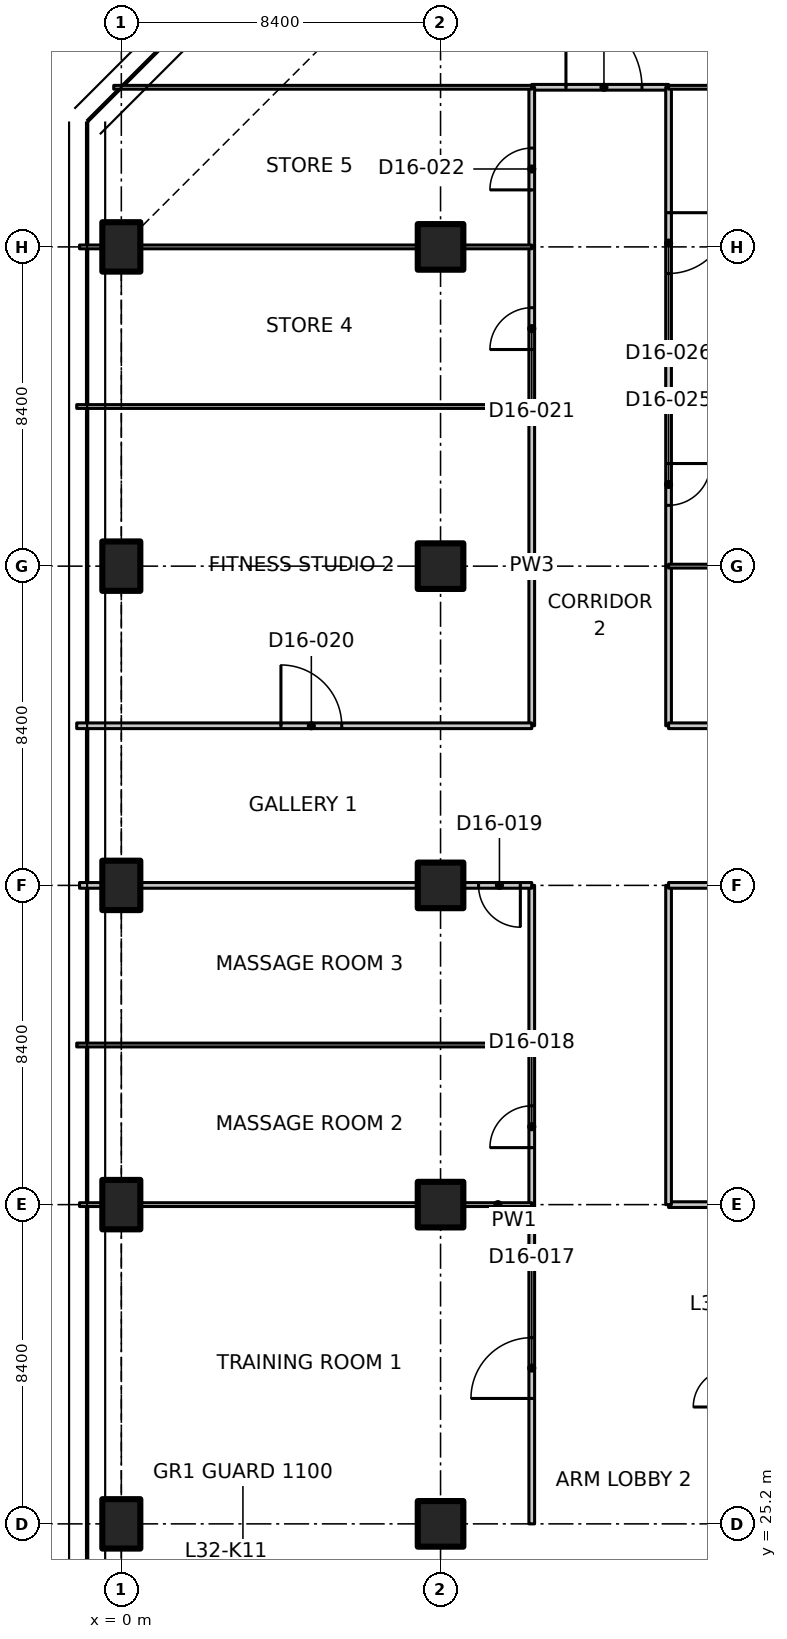
"""IFC4 building model, lengths in metres.
Left out: names, types, materials, properties, quantities, classifications, styles, units other than length and angle.
Written with IfcOpenShell. Run it as: python <this file> out.ifc"""

import sys

from ifc_helpers import new_model, si_unit, direction, frame, frame_2d, origin, origin_2d, place, context, subcontext, project, spatial, polyline, rectangle, outline, extrude, element, fill, save


model = new_model("IFC4")
c1 = context("Model", 3, precision=1e-05, world=origin(), true_north=direction((0.0, 1.0)))
c2 = subcontext(c1, "Body", "Model", "MODEL_VIEW")
j1 = project(units=[si_unit("LENGTHUNIT", "METRE"), si_unit("PLANEANGLEUNIT", "RADIAN")], contexts=[c1])
p1 = place(None, origin())
s1 = spatial("IfcSite", under=j1, at=p1, CompositionType="ELEMENT")
p2 = place(p1, origin())
s2 = spatial("IfcBuilding", under=s1, at=p2, CompositionType="ELEMENT")
p3 = place(p2, frame((0.0, 0.0, 131.3)))
s3 = spatial("IfcBuildingStorey", under=s2, at=p3, CompositionType="ELEMENT", Elevation=131.3)
for number, where, z_axis, x_axis in (
    (1, (0.0, 25.2, 0.0), (0.0, 0.0, 1.0), (1.0, 0.0, 0.0)),
    (2, (0.0, 33.6, 0.0), (0.0, 0.0, 1.0), (1.0, 0.0, 0.0)),
    (3, (0.0, 42.0, 0.0), (0.0, 0.0, 1.0), (1.0, 0.0, 0.0)),
    (4, (0.0, 50.4, 0.0), (0.0, 0.0, 1.0), (1.0, 0.0, 0.0)),
    (5, (0.0, 58.8, 0.0), (0.0, 0.0, 1.0), (1.0, 0.0, 0.0)),
):
    element("IfcColumn", number, at=place(p3, frame(where, z_axis=z_axis, x_axis=x_axis)), inside=s3, PredefinedType="COLUMN", context=c2, shape_type="SweptSolid", body=[
        extrude(rectangle(XDim=1.0, YDim=1.3, at=origin_2d()), origin(), (0.0, 0.0, 1.0), 3.35),
    ])
for number, where, z_axis, x_axis in (
    (6, (8.4, 25.2, 0.0), (0.0, 0.0, 1.0), (1.0, 0.0, 0.0)),
    (7, (8.4, 33.6, 0.0), (0.0, 0.0, 1.0), (1.0, 0.0, 0.0)),
    (8, (8.4, 42.0, 0.0), (0.0, 0.0, 1.0), (1.0, 0.0, 0.0)),
    (9, (8.4, 50.4, 0.0), (0.0, 0.0, 1.0), (1.0, 0.0, 0.0)),
    (10, (8.4, 58.8, 0.0), (0.0, 0.0, 1.0), (1.0, 0.0, 0.0)),
):
    element("IfcColumn", number, at=place(p3, frame(where, z_axis=z_axis, x_axis=x_axis)), inside=s3, PredefinedType="COLUMN", context=c2, shape_type="SweptSolid", body=[
        extrude(rectangle(XDim=1.2, YDim=1.2, at=origin_2d()), origin(), (0.0, 0.0, 1.0), 3.35),
    ])
p4 = place(p3, frame((10.8, 25.2, 0.0), z_axis=(0.0, 0.0, 1.0), x_axis=(0.0, 1.0, 0.0)))
e11 = element("IfcWall", 11, at=p4, inside=s3, PredefinedType="PARTITIONING", context=c2, shape_type="SweptSolid", body=[
    extrude(rectangle(XDim=8.4, YDim=0.15, at=frame_2d((4.2, 0.0))), origin(), (0.0, 0.0, 1.0), 3.33),
])
p5 = place(p4, frame((3.3, 0.0, 0.0)))
e12 = element("IfcOpeningElement", 12, at=p5, cuts=e11, PredefinedType="OPENING", context=c2, shape_type="SweptSolid", body=[
    extrude(rectangle(XDim=1.6, YDim=2.1, at=frame_2d((0.8, 1.05))), frame((0.0, 0.085, 0.0), z_axis=(0.0, -1.0, 0.0), x_axis=(1.0, 0.0, 0.0)), (0.0, 0.0, 1.0), 0.17),
])
p6 = place(p3, frame((14.4, 33.6, 0.0), z_axis=(0.0, 0.0, 1.0), x_axis=(1.0, 0.0, 0.0)))
e13 = element("IfcWall", 13, at=p6, inside=s3, PredefinedType="PARTITIONING", context=c2, shape_type="SweptSolid", body=[
    extrude(rectangle(XDim=1.5, YDim=0.15, at=frame_2d((0.75, 0.0))), origin(), (0.0, 0.0, 1.0), 3.33),
])
p7 = place(p3, frame((10.8, 63.0, 0.0), z_axis=(0.0, 0.0, 1.0), x_axis=(1.0, 0.0, 0.0)))
e14 = element("IfcWall", 14, at=p7, inside=s3, PredefinedType="PARTITIONING", context=c2, shape_type="SweptSolid", body=[
    extrude(rectangle(XDim=3.6, YDim=0.15, at=frame_2d((1.8, 0.0))), origin(), (0.0, 0.0, 1.0), 3.33),
])
p8 = place(p7, frame((0.9, 0.0, 0.0)))
e15 = element("IfcOpeningElement", 15, at=p8, cuts=e14, PredefinedType="OPENING", context=c2, shape_type="SweptSolid", body=[
    extrude(rectangle(XDim=2.0, YDim=2.4, at=frame_2d((1.0, 1.2))), frame((0.0, 0.085, 0.0), z_axis=(0.0, -1.0, 0.0), x_axis=(1.0, 0.0, 0.0)), (0.0, 0.0, 1.0), 0.17),
])
p9 = place(p3, frame((10.8, 33.6, 0.0), z_axis=(0.0, 0.0, 1.0), x_axis=(0.0, 1.0, 0.0)))
e16 = element("IfcWall", 16, at=p9, inside=s3, PredefinedType="PARTITIONING", context=c2, shape_type="SweptSolid", body=[
    extrude(rectangle(XDim=4.2, YDim=0.15, at=frame_2d((2.1, 0.0))), origin(), (0.0, 0.0, 1.0), 3.33),
])
p10 = place(p9, frame((1.5, 0.0, 0.0)))
e17 = element("IfcOpeningElement", 17, at=p10, cuts=e16, PredefinedType="OPENING", context=c2, shape_type="SweptSolid", body=[
    extrude(rectangle(XDim=1.1, YDim=2.1, at=frame_2d((0.55, 1.05))), frame((0.0, 0.085, 0.0), z_axis=(0.0, -1.0, 0.0), x_axis=(1.0, 0.0, 0.0)), (0.0, 0.0, 1.0), 0.17),
])
p11 = place(p3, frame((10.8, 37.8, 0.0), z_axis=(0.0, 0.0, 1.0), x_axis=(0.0, 1.0, 0.0)))
e18 = element("IfcWall", 18, at=p11, inside=s3, PredefinedType="PARTITIONING", context=c2, shape_type="SweptSolid", body=[
    extrude(rectangle(XDim=4.2, YDim=0.15, at=frame_2d((2.1, 0.0))), origin(), (0.0, 0.0, 1.0), 3.33),
])
p12 = place(p3, frame((10.8, 46.2, 0.0), z_axis=(0.0, 0.0, 1.0), x_axis=(0.0, 1.0, 0.0)))
e19 = element("IfcWall", 19, at=p12, inside=s3, PredefinedType="PARTITIONING", context=c2, shape_type="SweptSolid", body=[
    extrude(rectangle(XDim=8.4, YDim=0.15, at=frame_2d((4.2, 0.0))), origin(), (0.0, 0.0, 1.0), 3.33),
])
p13 = place(p3, frame((10.8, 54.6, 0.0), z_axis=(0.0, 0.0, 1.0), x_axis=(0.0, 1.0, 0.0)))
e20 = element("IfcWall", 20, at=p13, inside=s3, PredefinedType="PARTITIONING", context=c2, shape_type="SweptSolid", body=[
    extrude(rectangle(XDim=4.2, YDim=0.15, at=frame_2d((2.1, 0.0))), origin(), (0.0, 0.0, 1.0), 3.33),
])
p14 = place(p13, frame((1.5, 0.0, 0.0)))
e21 = element("IfcOpeningElement", 21, at=p14, cuts=e20, PredefinedType="OPENING", context=c2, shape_type="SweptSolid", body=[
    extrude(rectangle(XDim=1.1, YDim=2.1, at=frame_2d((0.55, 1.05))), frame((0.0, 0.085, 0.0), z_axis=(0.0, -1.0, 0.0), x_axis=(1.0, 0.0, 0.0)), (0.0, 0.0, 1.0), 0.17),
])
p15 = place(p3, frame((10.8, 58.8, 0.0), z_axis=(0.0, 0.0, 1.0), x_axis=(0.0, 1.0, 0.0)))
e22 = element("IfcWall", 22, at=p15, inside=s3, PredefinedType="PARTITIONING", context=c2, shape_type="SweptSolid", body=[
    extrude(rectangle(XDim=4.2, YDim=0.15, at=frame_2d((2.1, 0.0))), origin(), (0.0, 0.0, 1.0), 3.33),
])
p16 = place(p15, frame((1.5, 0.0, 0.0)))
e23 = element("IfcOpeningElement", 23, at=p16, cuts=e22, PredefinedType="OPENING", context=c2, shape_type="SweptSolid", body=[
    extrude(rectangle(XDim=1.1, YDim=2.1, at=frame_2d((0.55, 1.05))), frame((0.0, 0.085, 0.0), z_axis=(0.0, -1.0, 0.0), x_axis=(1.0, 0.0, 0.0)), (0.0, 0.0, 1.0), 0.17),
])
p17 = place(p3, frame((14.4, 42.0, 0.0), z_axis=(0.0, 0.0, 1.0), x_axis=(0.0, -1.0, 0.0)))
e24 = element("IfcWall", 24, at=p17, inside=s3, PredefinedType="PARTITIONING", context=c2, shape_type="SweptSolid", body=[
    extrude(rectangle(XDim=8.4, YDim=0.15, at=frame_2d((4.2, 0.0))), origin(), (0.0, 0.0, 1.0), 3.33),
])
p18 = place(p3, frame((14.4, 50.4, 0.0), z_axis=(0.0, 0.0, 1.0), x_axis=(0.0, -1.0, 0.0)))
e25 = element("IfcWall", 25, at=p18, inside=s3, PredefinedType="PARTITIONING", context=c2, shape_type="SweptSolid", body=[
    extrude(rectangle(XDim=4.2, YDim=0.15, at=frame_2d((2.1, 0.0))), origin(), (0.0, 0.0, 1.0), 3.33),
])
p19 = place(p3, frame((14.4, 54.6, 0.0), z_axis=(0.0, 0.0, 1.0), x_axis=(0.0, -1.0, 0.0)))
e26 = element("IfcWall", 26, at=p19, inside=s3, PredefinedType="PARTITIONING", context=c2, shape_type="SweptSolid", body=[
    extrude(rectangle(XDim=4.2, YDim=0.15, at=frame_2d((2.1, 0.0))), origin(), (0.0, 0.0, 1.0), 3.33),
])
p20 = place(p19, frame((1.5, 0.0, 0.0)))
e27 = element("IfcOpeningElement", 27, at=p20, cuts=e26, PredefinedType="OPENING", context=c2, shape_type="SweptSolid", body=[
    extrude(rectangle(XDim=1.1, YDim=2.1, at=frame_2d((0.55, 1.05))), frame((0.0, 0.085, 0.0), z_axis=(0.0, -1.0, 0.0), x_axis=(1.0, 0.0, 0.0)), (0.0, 0.0, 1.0), 0.17),
])
p21 = place(p3, frame((14.4, 63.0, 0.0), z_axis=(0.0, 0.0, 1.0), x_axis=(0.0, -1.0, 0.0)))
e28 = element("IfcWall", 28, at=p21, inside=s3, PredefinedType="PARTITIONING", context=c2, shape_type="SweptSolid", body=[
    extrude(rectangle(XDim=8.4, YDim=0.15, at=frame_2d((4.2, 0.0))), origin(), (0.0, 0.0, 1.0), 3.33),
])
p22 = place(p21, frame((3.3, 0.0, 0.0)))
e29 = element("IfcOpeningElement", 29, at=p22, cuts=e28, PredefinedType="OPENING", context=c2, shape_type="SweptSolid", body=[
    extrude(rectangle(XDim=1.6, YDim=2.1, at=frame_2d((0.8, 1.05))), frame((0.0, 0.085, 0.0), z_axis=(0.0, -1.0, 0.0), x_axis=(1.0, 0.0, 0.0)), (0.0, 0.0, 1.0), 0.17),
])
p23 = place(p3, frame((10.8, 63.0, 0.0), z_axis=(0.0, 0.0, 1.0), x_axis=(-1.0, 0.0, 0.0)))
e30 = element("IfcWall", 30, at=p23, inside=s3, PredefinedType="PARTITIONING", context=c2, shape_type="SweptSolid", body=[
    extrude(outline(polyline([(0.0, 0.0), (11.0, 0.0), (11.0, 3.33), (7.266, 3.33), (7.264, 2.98), (5.936, 2.98), (5.934, 3.33), (0.0, 3.33), (0.0, 0.0)])), frame((0.0, 0.05, 0.0), z_axis=(0.0, -1.0, 0.0), x_axis=(1.0, 0.0, 0.0)), (0.0, 0.0, 1.0), 0.1),
])
p24 = place(p3, frame((25.4, 63.0, 0.0), z_axis=(0.0, 0.0, 1.0), x_axis=(-1.0, 0.0, 0.0)))
e31 = element("IfcWall", 31, at=p24, inside=s3, PredefinedType="PARTITIONING", context=c2, shape_type="SweptSolid", body=[
    extrude(outline(polyline([(0.0, 0.0), (11.0, 0.0), (11.0, 3.33), (5.066, 3.33), (5.064, 2.98), (3.736, 2.98), (3.734, 3.33), (0.0, 3.33), (0.0, 0.0)])), frame((0.0, 0.05, 0.0), z_axis=(0.0, -1.0, 0.0), x_axis=(1.0, 0.0, 0.0)), (0.0, 0.0, 1.0), 0.1),
])
p25 = place(p3, frame((10.8, 42.0, 0.0), z_axis=(0.0, 0.0, 1.0), x_axis=(-1.0, 0.0, 0.0)))
e32 = element("IfcWall", 32, at=p25, inside=s3, PredefinedType="PARTITIONING", context=c2, shape_type="SweptSolid", body=[
    extrude(rectangle(XDim=1.78, YDim=0.15, at=frame_2d((0.89, 0.0))), origin(), (0.0, 0.0, 1.0), 3.33),
])
p26 = place(p25, frame((0.3, 0.0, 0.0)))
e33 = element("IfcOpeningElement", 33, at=p26, cuts=e32, PredefinedType="OPENING", context=c2, shape_type="SweptSolid", body=[
    extrude(rectangle(XDim=1.1, YDim=2.1, at=frame_2d((0.55, 1.05))), frame((0.0, 0.085, 0.0), z_axis=(0.0, -1.0, 0.0), x_axis=(1.0, 0.0, 0.0)), (0.0, 0.0, 1.0), 0.17),
])
p27 = place(p3, frame((7.78, 42.0, 0.0), z_axis=(0.0, 0.0, 1.0), x_axis=(-1.0, 0.0, 0.0)))
e34 = element("IfcWall", 34, at=p27, inside=s3, PredefinedType="PARTITIONING", context=c2, shape_type="SweptSolid", body=[
    extrude(rectangle(XDim=7.26, YDim=0.15, at=frame_2d((3.63, 0.0))), origin(), (0.0, 0.0, 1.0), 3.33),
])
p28 = place(p3, frame((-0.52, 42.0, 0.0), z_axis=(0.0, 0.0, 1.0), x_axis=(-1.0, 0.0, 0.0)))
e35 = element("IfcWall", 35, at=p28, inside=s3, PredefinedType="PARTITIONING", context=c2, shape_type="SweptSolid", body=[
    extrude(rectangle(XDim=0.58, YDim=0.15, at=frame_2d((0.29, 0.0))), origin(), (0.0, 0.0, 1.0), 3.33),
])
p29 = place(p3, frame((-1.174, 46.2, 0.0), z_axis=(0.0, 0.0, 1.0), x_axis=(1.0, 0.0, 0.0)))
e36 = element("IfcWall", 36, at=p29, inside=s3, PredefinedType="PARTITIONING", context=c2, shape_type="SweptSolid", body=[
    extrude(outline(polyline([(0.0, 0.0), (11.974, 0.0), (11.974, 3.33), (1.624, 3.33), (1.622, 2.98), (0.726, 2.98), (0.724, 3.33), (0.074, 3.33), (0.0, 3.33), (0.0, 0.0)])), frame((0.0, 0.075, 0.0), z_axis=(0.0, -1.0, 0.0), x_axis=(1.0, 0.0, 0.0)), (0.0, 0.0, 1.0), 0.15),
])
p30 = place(p29, frame((5.374, 0.0, 0.0)))
e37 = element("IfcOpeningElement", 37, at=p30, cuts=e36, PredefinedType="OPENING", context=c2, shape_type="SweptSolid", body=[
    extrude(rectangle(XDim=1.6, YDim=2.1, at=frame_2d((0.8, 1.05))), frame((0.0, 0.085, 0.0), z_axis=(0.0, -1.0, 0.0), x_axis=(1.0, 0.0, 0.0)), (0.0, 0.0, 1.0), 0.17),
])
p31 = place(p3, frame((-1.1, 33.6, 0.0), z_axis=(0.0, 0.0, 1.0), x_axis=(1.0, 0.0, 0.0)))
e38 = element("IfcWall", 38, at=p31, inside=s3, PredefinedType="PARTITIONING", context=c2, shape_type="SweptSolid", body=[
    extrude(rectangle(XDim=0.58, YDim=0.1, at=frame_2d((0.29, 0.0))), origin(), (0.0, 0.0, 1.0), 3.33),
])
p32 = place(p3, frame((0.52, 33.6, 0.0), z_axis=(0.0, 0.0, 1.0), x_axis=(1.0, 0.0, 0.0)))
e39 = element("IfcWall", 39, at=p32, inside=s3, PredefinedType="PARTITIONING", context=c2, shape_type="SweptSolid", body=[
    extrude(rectangle(XDim=7.26, YDim=0.1, at=frame_2d((3.63, 0.0))), origin(), (0.0, 0.0, 1.0), 3.33),
])
p33 = place(p3, frame((9.02, 33.6, 0.0), z_axis=(0.0, 0.0, 1.0), x_axis=(1.0, 0.0, 0.0)))
e40 = element("IfcWall", 40, at=p33, inside=s3, PredefinedType="PARTITIONING", context=c2, shape_type="SweptSolid", body=[
    extrude(rectangle(XDim=1.78, YDim=0.1, at=frame_2d((0.89, 0.0))), origin(), (0.0, 0.0, 1.0), 3.33),
])
for number, where, z_axis, x_axis in (
    (41, (-1.174, 37.8, 0.0), (0.0, 0.0, 1.0), (1.0, 0.0, 0.0)),
    (42, (-1.174, 54.6, 0.0), (0.0, 0.0, 1.0), (1.0, 0.0, 0.0)),
):
    element("IfcWall", number, at=place(p3, frame(where, z_axis=z_axis, x_axis=x_axis)), inside=s3, PredefinedType="PARTITIONING", context=c2, shape_type="SweptSolid", body=[
        extrude(outline(polyline([(0.0, 0.0), (11.974, 0.0), (11.974, 3.33), (1.624, 3.33), (1.622, 2.98), (0.726, 2.98), (0.724, 3.33), (0.074, 3.33), (0.0, 3.33), (0.0, 0.0)])), frame((0.0, 0.05, 0.0), z_axis=(0.0, -1.0, 0.0), x_axis=(1.0, 0.0, 0.0)), (0.0, 0.0, 1.0), 0.1),
    ])
p34 = place(p3, frame((-1.1, 58.8, 0.0), z_axis=(0.0, 0.0, 1.0), x_axis=(1.0, 0.0, 0.0)))
e43 = element("IfcWall", 43, at=p34, inside=s3, PredefinedType="PARTITIONING", context=c2, shape_type="SweptSolid", body=[
    extrude(rectangle(XDim=0.58, YDim=0.1, at=frame_2d((0.29, 0.0))), origin(), (0.0, 0.0, 1.0), 3.33),
])
p35 = place(p3, frame((0.52, 58.8, 0.0), z_axis=(0.0, 0.0, 1.0), x_axis=(1.0, 0.0, 0.0)))
e44 = element("IfcWall", 44, at=p35, inside=s3, PredefinedType="PARTITIONING", context=c2, shape_type="SweptSolid", body=[
    extrude(outline(polyline([(0.0, 0.0), (7.26, 0.0), (7.26, 3.33), (0.146, 3.33), (0.144, 2.98), (0.0, 2.98), (0.0, 0.0)])), frame((0.0, 0.05, 0.0), z_axis=(0.0, -1.0, 0.0), x_axis=(1.0, 0.0, 0.0)), (0.0, 0.0, 1.0), 0.1),
])
p36 = place(p3, frame((9.02, 58.8, 0.0), z_axis=(0.0, 0.0, 1.0), x_axis=(1.0, 0.0, 0.0)))
e45 = element("IfcWall", 45, at=p36, inside=s3, PredefinedType="PARTITIONING", context=c2, shape_type="SweptSolid", body=[
    extrude(rectangle(XDim=1.78, YDim=0.1, at=frame_2d((0.89, 0.0))), origin(), (0.0, 0.0, 1.0), 3.33),
])
p37 = place(p3, frame((16.18, 42.0, 0.0), z_axis=(0.0, 0.0, 1.0), x_axis=(-1.0, 0.0, 0.0)))
e46 = element("IfcWall", 46, at=p37, inside=s3, PredefinedType="PARTITIONING", context=c2, shape_type="SweptSolid", body=[
    extrude(rectangle(XDim=1.78, YDim=0.15, at=frame_2d((0.89, 0.0))), origin(), (0.0, 0.0, 1.0), 3.33),
])
p38 = place(p3, frame((14.4, 46.2, 0.0), z_axis=(0.0, 0.0, 1.0), x_axis=(1.0, 0.0, 0.0)))
e47 = element("IfcWall", 47, at=p38, inside=s3, PredefinedType="PARTITIONING", context=c2, shape_type="SweptSolid", body=[
    extrude(outline(polyline([(0.0, 0.0), (11.974, 0.0), (11.974, 3.33), (11.9, 3.33), (11.25, 3.33), (11.248, 2.98), (10.352, 2.98), (10.35, 3.33), (0.0, 3.33), (0.0, 0.0)])), frame((0.0, 0.075, 0.0), z_axis=(0.0, -1.0, 0.0), x_axis=(1.0, 0.0, 0.0)), (0.0, 0.0, 1.0), 0.15),
])
p39 = place(p38, frame((5.4, 0.0, 0.0)))
e48 = element("IfcOpeningElement", 48, at=p39, cuts=e47, PredefinedType="OPENING", context=c2, shape_type="SweptSolid", body=[
    extrude(rectangle(XDim=1.1, YDim=2.1, at=frame_2d((0.55, 1.05))), frame((0.0, 0.085, 0.0), z_axis=(0.0, -1.0, 0.0), x_axis=(1.0, 0.0, 0.0)), (0.0, 0.0, 1.0), 0.17),
])
p40 = place(p3, frame((14.4, 50.4, 0.0), z_axis=(0.0, 0.0, 1.0), x_axis=(1.0, 0.0, 0.0)))
e49 = element("IfcWall", 49, at=p40, inside=s3, PredefinedType="PARTITIONING", context=c2, shape_type="SweptSolid", body=[
    extrude(rectangle(XDim=1.78, YDim=0.1, at=frame_2d((0.89, 0.0))), origin(), (0.0, 0.0, 1.0), 3.33),
])
p41 = place(p3, frame((14.4, 54.6, 0.0), z_axis=(0.0, 0.0, 1.0), x_axis=(1.0, 0.0, 0.0)))
e50 = element("IfcWall", 50, at=p41, inside=s3, PredefinedType="PARTITIONING", context=c2, shape_type="SweptSolid", body=[
    extrude(outline(polyline([(0.0, 0.0), (11.974, 0.0), (11.974, 3.33), (11.9, 3.33), (11.25, 3.33), (11.248, 2.98), (10.352, 2.98), (10.35, 3.33), (0.0, 3.33), (0.0, 0.0)])), frame((0.0, 0.05, 0.0), z_axis=(0.0, -1.0, 0.0), x_axis=(1.0, 0.0, 0.0)), (0.0, 0.0, 1.0), 0.1),
])
p42 = place(p8, origin())
e51 = element("IfcDoor", 51, at=p42, inside=s3, OperationType="DOUBLE_DOOR_SINGLE_SWING", PredefinedType="DOOR", context=c2, shape_type="SweptSolid", body=[
    extrude(rectangle(XDim=2.0, YDim=2.4, at=frame_2d((1.0, 1.2))), frame((0.0, 0.025, 0.0), z_axis=(0.0, -1.0, 0.0), x_axis=(1.0, 0.0, 0.0)), (0.0, 0.0, 1.0), 0.05),
])
fill(e15, e51)
p43 = place(p5, origin())
e52 = element("IfcDoor", 52, at=p43, inside=s3, OperationType="DOUBLE_DOOR_SINGLE_SWING", PredefinedType="DOOR", context=c2, shape_type="SweptSolid", body=[
    extrude(rectangle(XDim=1.6, YDim=2.1, at=frame_2d((0.8, 1.05))), frame((0.0, 0.025, 0.0), z_axis=(0.0, -1.0, 0.0), x_axis=(1.0, 0.0, 0.0)), (0.0, 0.0, 1.0), 0.05),
])
fill(e12, e52)
p44 = place(p10, origin())
e53 = element("IfcDoor", 53, at=p44, inside=s3, OperationType="SINGLE_SWING_LEFT", PredefinedType="DOOR", context=c2, shape_type="SweptSolid", body=[
    extrude(rectangle(XDim=1.1, YDim=2.1, at=frame_2d((0.55, 1.05))), frame((0.0, 0.025, 0.0), z_axis=(0.0, -1.0, 0.0), x_axis=(1.0, 0.0, 0.0)), (0.0, 0.0, 1.0), 0.05),
])
fill(e17, e53)
p45 = place(p26, origin())
e54 = element("IfcDoor", 54, at=p45, inside=s3, OperationType="SINGLE_SWING_LEFT", PredefinedType="DOOR", context=c2, shape_type="SweptSolid", body=[
    extrude(rectangle(XDim=1.1, YDim=2.1, at=frame_2d((0.55, 1.05))), frame((0.0, 0.025, 0.0), z_axis=(0.0, -1.0, 0.0), x_axis=(1.0, 0.0, 0.0)), (0.0, 0.0, 1.0), 0.05),
])
fill(e33, e54)
p46 = place(p30, origin())
e55 = element("IfcDoor", 55, at=p46, inside=s3, OperationType="DOUBLE_DOOR_SINGLE_SWING", PredefinedType="DOOR", context=c2, shape_type="SweptSolid", body=[
    extrude(rectangle(XDim=1.6, YDim=2.1, at=frame_2d((0.8, 1.05))), frame((0.0, 0.025, 0.0), z_axis=(0.0, -1.0, 0.0), x_axis=(1.0, 0.0, 0.0)), (0.0, 0.0, 1.0), 0.05),
])
fill(e37, e55)
p47 = place(p14, origin())
e56 = element("IfcDoor", 56, at=p47, inside=s3, OperationType="SINGLE_SWING_LEFT", PredefinedType="DOOR", context=c2, shape_type="SweptSolid", body=[
    extrude(rectangle(XDim=1.1, YDim=2.1, at=frame_2d((0.55, 1.05))), frame((0.0, 0.025, 0.0), z_axis=(0.0, -1.0, 0.0), x_axis=(1.0, 0.0, 0.0)), (0.0, 0.0, 1.0), 0.05),
])
fill(e21, e56)
p48 = place(p16, origin())
e57 = element("IfcDoor", 57, at=p48, inside=s3, OperationType="SINGLE_SWING_LEFT", PredefinedType="DOOR", context=c2, shape_type="SweptSolid", body=[
    extrude(rectangle(XDim=1.1, YDim=2.1, at=frame_2d((0.55, 1.05))), frame((0.0, 0.025, 0.0), z_axis=(0.0, -1.0, 0.0), x_axis=(1.0, 0.0, 0.0)), (0.0, 0.0, 1.0), 0.05),
])
fill(e23, e57)
p49 = place(p20, origin())
e58 = element("IfcDoor", 58, at=p49, inside=s3, OperationType="SINGLE_SWING_LEFT", PredefinedType="DOOR", context=c2, shape_type="SweptSolid", body=[
    extrude(rectangle(XDim=1.1, YDim=2.1, at=frame_2d((0.55, 1.05))), frame((0.0, 0.025, 0.0), z_axis=(0.0, -1.0, 0.0), x_axis=(1.0, 0.0, 0.0)), (0.0, 0.0, 1.0), 0.05),
])
fill(e27, e58)
p50 = place(p22, origin())
e59 = element("IfcDoor", 59, at=p50, inside=s3, OperationType="DOUBLE_DOOR_SINGLE_SWING", PredefinedType="DOOR", context=c2, shape_type="SweptSolid", body=[
    extrude(rectangle(XDim=1.6, YDim=2.1, at=frame_2d((0.8, 1.05))), frame((0.0, 0.025, 0.0), z_axis=(0.0, -1.0, 0.0), x_axis=(1.0, 0.0, 0.0)), (0.0, 0.0, 1.0), 0.05),
])
fill(e29, e59)
save(model, sys.argv[1])
